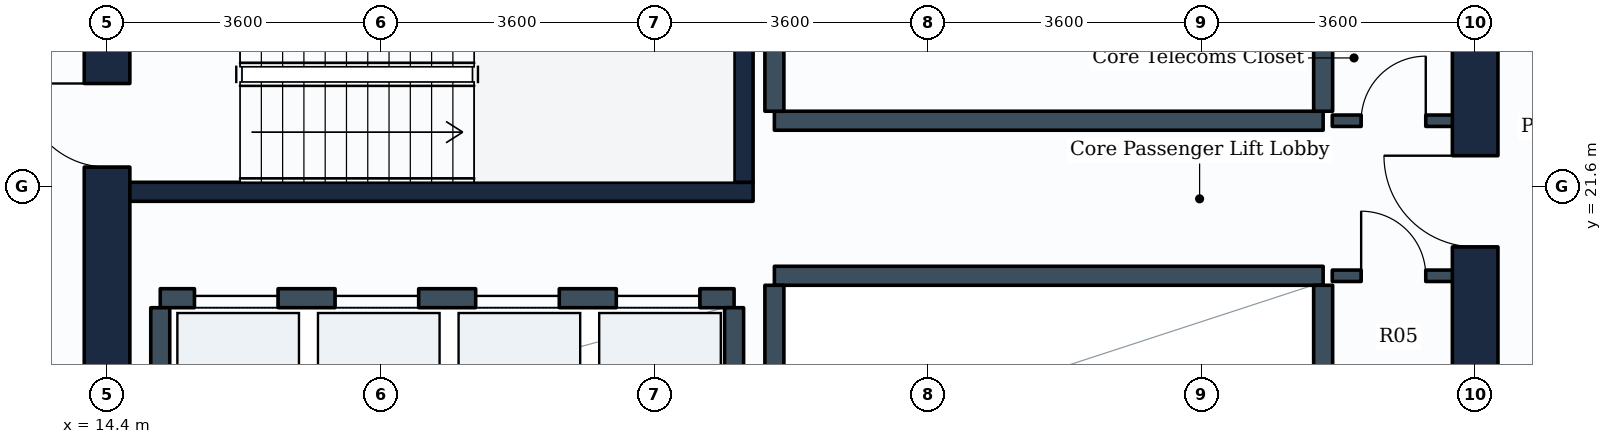
"""IFC4 building model, lengths in metres.
Left out: names, types, materials, properties, quantities, classifications, styles, units other than length and angle.
Written with IfcOpenShell. Run it as: python <this file> out.ifc"""

import sys

from ifc_helpers import new_model, si_unit, direction, frame, frame_2d, origin, place, context, subcontext, project, spatial, rectangle, extrude, element, fill, save


model = new_model("IFC4")
c1 = context("Model", 3, precision=1e-05, world=origin(), true_north=direction((0.0, 1.0)))
c2 = subcontext(c1, "Body", "Model", "MODEL_VIEW")
j1 = project(units=[si_unit("LENGTHUNIT", "METRE"), si_unit("PLANEANGLEUNIT", "RADIAN")], contexts=[c1])
p1 = place(None, origin())
s1 = spatial("IfcSite", under=j1, at=p1, CompositionType="ELEMENT")
p2 = place(p1, origin())
s2 = spatial("IfcBuilding", under=s1, at=p2, CompositionType="ELEMENT")
p3 = place(p2, frame((0.0, 0.0, 55.2)))
s3 = spatial("IfcBuildingStorey", under=s2, at=p3, CompositionType="ELEMENT", Elevation=55.2)
p4 = place(p3, frame((14.4, 10.8, 0.0), z_axis=(0.0, 0.0, 1.0), x_axis=(0.0, 1.0, 0.0)))
e1 = element("IfcWall", 1, at=p4, inside=s3, PredefinedType="SHEAR", context=c2, shape_type="SweptSolid", body=[
    extrude(rectangle(XDim=14.4, YDim=0.6, at=frame_2d((7.2, 0.0))), origin(), (0.0, 0.0, 1.0), 3.65),
])
p5 = place(p4, frame((11.05, 0.0, 0.0)))
e2 = element("IfcOpeningElement", 2, at=p5, cuts=e1, PredefinedType="OPENING", context=c2, shape_type="SweptSolid", body=[
    extrude(rectangle(XDim=1.1, YDim=2.1, at=frame_2d((0.55, 1.05))), frame((0.0, 0.31, 0.0), z_axis=(0.0, -1.0, 0.0), x_axis=(1.0, 0.0, 0.0)), (0.0, 0.0, 1.0), 0.62),
])
p6 = place(p4, frame((4.9, 0.0, 0.0)))
e3 = element("IfcOpeningElement", 3, at=p6, cuts=e1, PredefinedType="OPENING", context=c2, shape_type="SweptSolid", body=[
    extrude(rectangle(XDim=1.2, YDim=2.1, at=frame_2d((0.6, 1.05))), frame((0.0, 0.31, 0.0), z_axis=(0.0, -1.0, 0.0), x_axis=(1.0, 0.0, 0.0)), (0.0, 0.0, 1.0), 0.62),
])
p7 = place(p3, frame((32.4, 10.8, 0.0), z_axis=(0.0, 0.0, 1.0), x_axis=(0.0, 1.0, 0.0)))
e4 = element("IfcWall", 4, at=p7, inside=s3, PredefinedType="SHEAR", context=c2, shape_type="SweptSolid", body=[
    extrude(rectangle(XDim=14.4, YDim=0.6, at=frame_2d((7.2, 0.0))), origin(), (0.0, 0.0, 1.0), 3.65),
])
p8 = place(p7, frame((4.35, 0.0, 0.0)))
e5 = element("IfcOpeningElement", 5, at=p8, cuts=e4, PredefinedType="OPENING", context=c2, shape_type="SweptSolid", body=[
    extrude(rectangle(XDim=1.2, YDim=2.1, at=frame_2d((0.6, 1.05))), frame((0.0, 0.31, 0.0), z_axis=(0.0, -1.0, 0.0), x_axis=(1.0, 0.0, 0.0)), (0.0, 0.0, 1.0), 0.62),
])
p9 = place(p7, frame((10.0, 0.0, 0.0)))
e6 = element("IfcOpeningElement", 6, at=p9, cuts=e4, PredefinedType="OPENING", context=c2, shape_type="SweptSolid", body=[
    extrude(rectangle(XDim=1.2, YDim=2.1, at=frame_2d((0.6, 1.05))), frame((0.0, 0.31, 0.0), z_axis=(0.0, -1.0, 0.0), x_axis=(1.0, 0.0, 0.0)), (0.0, 0.0, 1.0), 0.62),
])
p10 = place(p3, frame((14.7, 21.525, 0.0), z_axis=(0.0, 0.0, 1.0), x_axis=(1.0, 0.0, 0.0)))
e7 = element("IfcWall", 7, at=p10, inside=s3, PredefinedType="SHEAR", context=c2, shape_type="SweptSolid", body=[
    extrude(rectangle(XDim=8.2, YDim=0.25, at=frame_2d((4.1, 0.0))), origin(), (0.0, 0.0, 1.0), 3.65),
])
p11 = place(p3, frame((22.775, 21.65, 0.0), z_axis=(0.0, 0.0, 1.0), x_axis=(0.0, 1.0, 0.0)))
e8 = element("IfcWall", 8, at=p11, inside=s3, PredefinedType="SHEAR", context=c2, shape_type="SweptSolid", body=[
    extrude(rectangle(XDim=2.84, YDim=0.25, at=frame_2d((1.42, 0.0))), origin(), (0.0, 0.0, 1.0), 3.65),
])
p12 = place(p3, frame((15.1, 20.125, 0.0), z_axis=(0.0, 0.0, 1.0), x_axis=(1.0, 0.0, 0.0)))
e9 = element("IfcWall", 9, at=p12, inside=s3, PredefinedType="PARTITIONING", context=c2, shape_type="SweptSolid", body=[
    extrude(rectangle(XDim=7.55, YDim=0.25, at=frame_2d((3.775, 0.0))), origin(), (0.0, 0.0, 1.0), 3.635),
])
p13 = place(p12, frame((0.45, 0.0, 0.0)))
e10 = element("IfcOpeningElement", 10, at=p13, cuts=e9, PredefinedType="OPENING", context=c2, shape_type="SweptSolid", body=[
    extrude(rectangle(XDim=1.1, YDim=2.1, at=frame_2d((0.55, 1.05))), frame((0.0, 0.135, 0.0), z_axis=(0.0, -1.0, 0.0), x_axis=(1.0, 0.0, 0.0)), (0.0, 0.0, 1.0), 0.27),
])
p14 = place(p12, frame((2.3, 0.0, 0.0)))
e11 = element("IfcOpeningElement", 11, at=p14, cuts=e9, PredefinedType="OPENING", context=c2, shape_type="SweptSolid", body=[
    extrude(rectangle(XDim=1.1, YDim=2.1, at=frame_2d((0.55, 1.05))), frame((0.0, 0.135, 0.0), z_axis=(0.0, -1.0, 0.0), x_axis=(1.0, 0.0, 0.0)), (0.0, 0.0, 1.0), 0.27),
])
p15 = place(p12, frame((4.15, 0.0, 0.0)))
e12 = element("IfcOpeningElement", 12, at=p15, cuts=e9, PredefinedType="OPENING", context=c2, shape_type="SweptSolid", body=[
    extrude(rectangle(XDim=1.1, YDim=2.1, at=frame_2d((0.55, 1.05))), frame((0.0, 0.135, 0.0), z_axis=(0.0, -1.0, 0.0), x_axis=(1.0, 0.0, 0.0)), (0.0, 0.0, 1.0), 0.27),
])
p16 = place(p12, frame((6.0, 0.0, 0.0)))
e13 = element("IfcOpeningElement", 13, at=p16, cuts=e9, PredefinedType="OPENING", context=c2, shape_type="SweptSolid", body=[
    extrude(rectangle(XDim=1.1, YDim=2.1, at=frame_2d((0.55, 1.05))), frame((0.0, 0.135, 0.0), z_axis=(0.0, -1.0, 0.0), x_axis=(1.0, 0.0, 0.0)), (0.0, 0.0, 1.0), 0.27),
])
for number, where, z_axis, x_axis in (
    (14, (15.1, 18.025, 0.0), (0.0, 0.0, 1.0), (0.0, 1.0, 0.0)),
    (15, (22.65, 18.025, 0.0), (0.0, 0.0, 1.0), (0.0, 1.0, 0.0)),
):
    element("IfcWall", number, at=place(p3, frame(where, z_axis=z_axis, x_axis=x_axis)), inside=s3, PredefinedType="PARTITIONING", context=c2, shape_type="SweptSolid", body=[
        extrude(rectangle(XDim=1.975, YDim=0.25, at=frame_2d((0.988, 0.0))), origin(), (0.0, 0.0, 1.0), 3.635),
    ])
p17 = place(p3, frame((23.18, 20.42, 0.0), z_axis=(0.0, 0.0, 1.0), x_axis=(1.0, 0.0, 0.0)))
e16 = element("IfcWall", 16, at=p17, inside=s3, PredefinedType="PARTITIONING", context=c2, shape_type="SweptSolid", body=[
    extrude(rectangle(XDim=7.22, YDim=0.25, at=frame_2d((3.61, 0.0))), origin(), (0.0, 0.0, 1.0), 3.635),
])
for number, where, z_axis, x_axis in (
    (17, (23.18, 18.025, 0.0), (0.0, 0.0, 1.0), (0.0, 1.0, 0.0)),
    (18, (30.4, 18.025, 0.0), (0.0, 0.0, 1.0), (0.0, 1.0, 0.0)),
):
    element("IfcWall", number, at=place(p3, frame(where, z_axis=z_axis, x_axis=x_axis)), inside=s3, PredefinedType="PARTITIONING", context=c2, shape_type="SweptSolid", body=[
        extrude(rectangle(XDim=2.27, YDim=0.25, at=frame_2d((1.135, 0.0))), origin(), (0.0, 0.0, 1.0), 3.635),
    ])
p18 = place(p3, frame((23.18, 22.46, 0.0), z_axis=(0.0, 0.0, 1.0), x_axis=(1.0, 0.0, 0.0)))
e19 = element("IfcWall", 19, at=p18, inside=s3, PredefinedType="PARTITIONING", context=c2, shape_type="SweptSolid", body=[
    extrude(rectangle(XDim=7.22, YDim=0.25, at=frame_2d((3.61, 0.0))), origin(), (0.0, 0.0, 1.0), 3.635),
])
for number, where, z_axis, x_axis in (
    (20, (23.18, 22.585, 0.0), (0.0, 0.0, 1.0), (0.0, 1.0, 0.0)),
    (21, (30.4, 22.585, 0.0), (0.0, 0.0, 1.0), (0.0, 1.0, 0.0)),
):
    element("IfcWall", number, at=place(p3, frame(where, z_axis=z_axis, x_axis=x_axis)), inside=s3, PredefinedType="PARTITIONING", context=c2, shape_type="SweptSolid", body=[
        extrude(rectangle(XDim=2.315, YDim=0.25, at=frame_2d((1.157, 0.0))), origin(), (0.0, 0.0, 1.0), 3.635),
    ])
p19 = place(p3, frame((30.52, 22.46, 0.0), z_axis=(0.0, 0.0, 1.0), x_axis=(1.0, 0.0, 0.0)))
e22 = element("IfcWall", 22, at=p19, inside=s3, PredefinedType="PARTITIONING", context=c2, shape_type="SweptSolid", body=[
    extrude(rectangle(XDim=1.63, YDim=0.15, at=frame_2d((0.815, 0.0))), origin(), (0.0, 0.0, 1.0), 3.635),
])
p20 = place(p19, frame((0.38, 0.0, 0.0)))
e23 = element("IfcOpeningElement", 23, at=p20, cuts=e22, PredefinedType="OPENING", context=c2, shape_type="SweptSolid", body=[
    extrude(rectangle(XDim=0.85, YDim=2.1, at=frame_2d((0.425, 1.05))), frame((0.0, 0.085, 0.0), z_axis=(0.0, -1.0, 0.0), x_axis=(1.0, 0.0, 0.0)), (0.0, 0.0, 1.0), 0.17),
])
p21 = place(p3, frame((30.52, 20.42, 0.0), z_axis=(0.0, 0.0, 1.0), x_axis=(1.0, 0.0, 0.0)))
e24 = element("IfcWall", 24, at=p21, inside=s3, PredefinedType="PARTITIONING", context=c2, shape_type="SweptSolid", body=[
    extrude(rectangle(XDim=1.63, YDim=0.15, at=frame_2d((0.815, 0.0))), origin(), (0.0, 0.0, 1.0), 3.635),
])
p22 = place(p21, frame((0.38, 0.0, 0.0)))
e25 = element("IfcOpeningElement", 25, at=p22, cuts=e24, PredefinedType="OPENING", context=c2, shape_type="SweptSolid", body=[
    extrude(rectangle(XDim=0.85, YDim=2.1, at=frame_2d((0.425, 1.05))), frame((0.0, 0.085, 0.0), z_axis=(0.0, -1.0, 0.0), x_axis=(1.0, 0.0, 0.0)), (0.0, 0.0, 1.0), 0.17),
])
p23 = place(p5, origin())
e26 = element("IfcDoor", 26, at=p23, inside=s3, OperationType="SINGLE_SWING_RIGHT", PredefinedType="DOOR", context=c2, shape_type="SweptSolid", body=[
    extrude(rectangle(XDim=1.1, YDim=2.1, at=frame_2d((0.55, 1.05))), frame((0.0, 0.025, 0.0), z_axis=(0.0, -1.0, 0.0), x_axis=(1.0, 0.0, 0.0)), (0.0, 0.0, 1.0), 0.05),
])
fill(e2, e26)
p24 = place(p13, origin())
e27 = element("IfcDoor", 27, at=p24, inside=s3, OperationType="SLIDING_TO_LEFT", PredefinedType="DOOR", context=c2, shape_type="SweptSolid", body=[
    extrude(rectangle(XDim=1.1, YDim=2.1, at=frame_2d((0.55, 1.05))), frame((0.0, 0.025, 0.0), z_axis=(0.0, -1.0, 0.0), x_axis=(1.0, 0.0, 0.0)), (0.0, 0.0, 1.0), 0.05),
])
fill(e10, e27)
p25 = place(p14, origin())
e28 = element("IfcDoor", 28, at=p25, inside=s3, OperationType="SLIDING_TO_LEFT", PredefinedType="DOOR", context=c2, shape_type="SweptSolid", body=[
    extrude(rectangle(XDim=1.1, YDim=2.1, at=frame_2d((0.55, 1.05))), frame((0.0, 0.025, 0.0), z_axis=(0.0, -1.0, 0.0), x_axis=(1.0, 0.0, 0.0)), (0.0, 0.0, 1.0), 0.05),
])
fill(e11, e28)
p26 = place(p15, origin())
e29 = element("IfcDoor", 29, at=p26, inside=s3, OperationType="SLIDING_TO_LEFT", PredefinedType="DOOR", context=c2, shape_type="SweptSolid", body=[
    extrude(rectangle(XDim=1.1, YDim=2.1, at=frame_2d((0.55, 1.05))), frame((0.0, 0.025, 0.0), z_axis=(0.0, -1.0, 0.0), x_axis=(1.0, 0.0, 0.0)), (0.0, 0.0, 1.0), 0.05),
])
fill(e12, e29)
p27 = place(p16, origin())
e30 = element("IfcDoor", 30, at=p27, inside=s3, OperationType="SLIDING_TO_LEFT", PredefinedType="DOOR", context=c2, shape_type="SweptSolid", body=[
    extrude(rectangle(XDim=1.1, YDim=2.1, at=frame_2d((0.55, 1.05))), frame((0.0, 0.025, 0.0), z_axis=(0.0, -1.0, 0.0), x_axis=(1.0, 0.0, 0.0)), (0.0, 0.0, 1.0), 0.05),
])
fill(e13, e30)
p28 = place(p9, origin())
e31 = element("IfcDoor", 31, at=p28, inside=s3, OperationType="SINGLE_SWING_RIGHT", PredefinedType="DOOR", context=c2, shape_type="SweptSolid", body=[
    extrude(rectangle(XDim=1.2, YDim=2.1, at=frame_2d((0.6, 1.05))), frame((0.0, 0.025, 0.0), z_axis=(0.0, -1.0, 0.0), x_axis=(1.0, 0.0, 0.0)), (0.0, 0.0, 1.0), 0.05),
])
fill(e6, e31)
p29 = place(p20, origin())
e32 = element("IfcDoor", 32, at=p29, inside=s3, OperationType="SINGLE_SWING_RIGHT", PredefinedType="DOOR", context=c2, shape_type="SweptSolid", body=[
    extrude(rectangle(XDim=0.85, YDim=2.1, at=frame_2d((0.425, 1.05))), frame((0.0, 0.025, 0.0), z_axis=(0.0, -1.0, 0.0), x_axis=(1.0, 0.0, 0.0)), (0.0, 0.0, 1.0), 0.05),
])
fill(e23, e32)
p30 = place(p22, origin())
e33 = element("IfcDoor", 33, at=p30, inside=s3, OperationType="SINGLE_SWING_LEFT", PredefinedType="DOOR", context=c2, shape_type="SweptSolid", body=[
    extrude(rectangle(XDim=0.85, YDim=2.1, at=frame_2d((0.425, 1.05))), frame((0.0, 0.025, 0.0), z_axis=(0.0, -1.0, 0.0), x_axis=(1.0, 0.0, 0.0)), (0.0, 0.0, 1.0), 0.05),
])
fill(e25, e33)
save(model, sys.argv[1])
